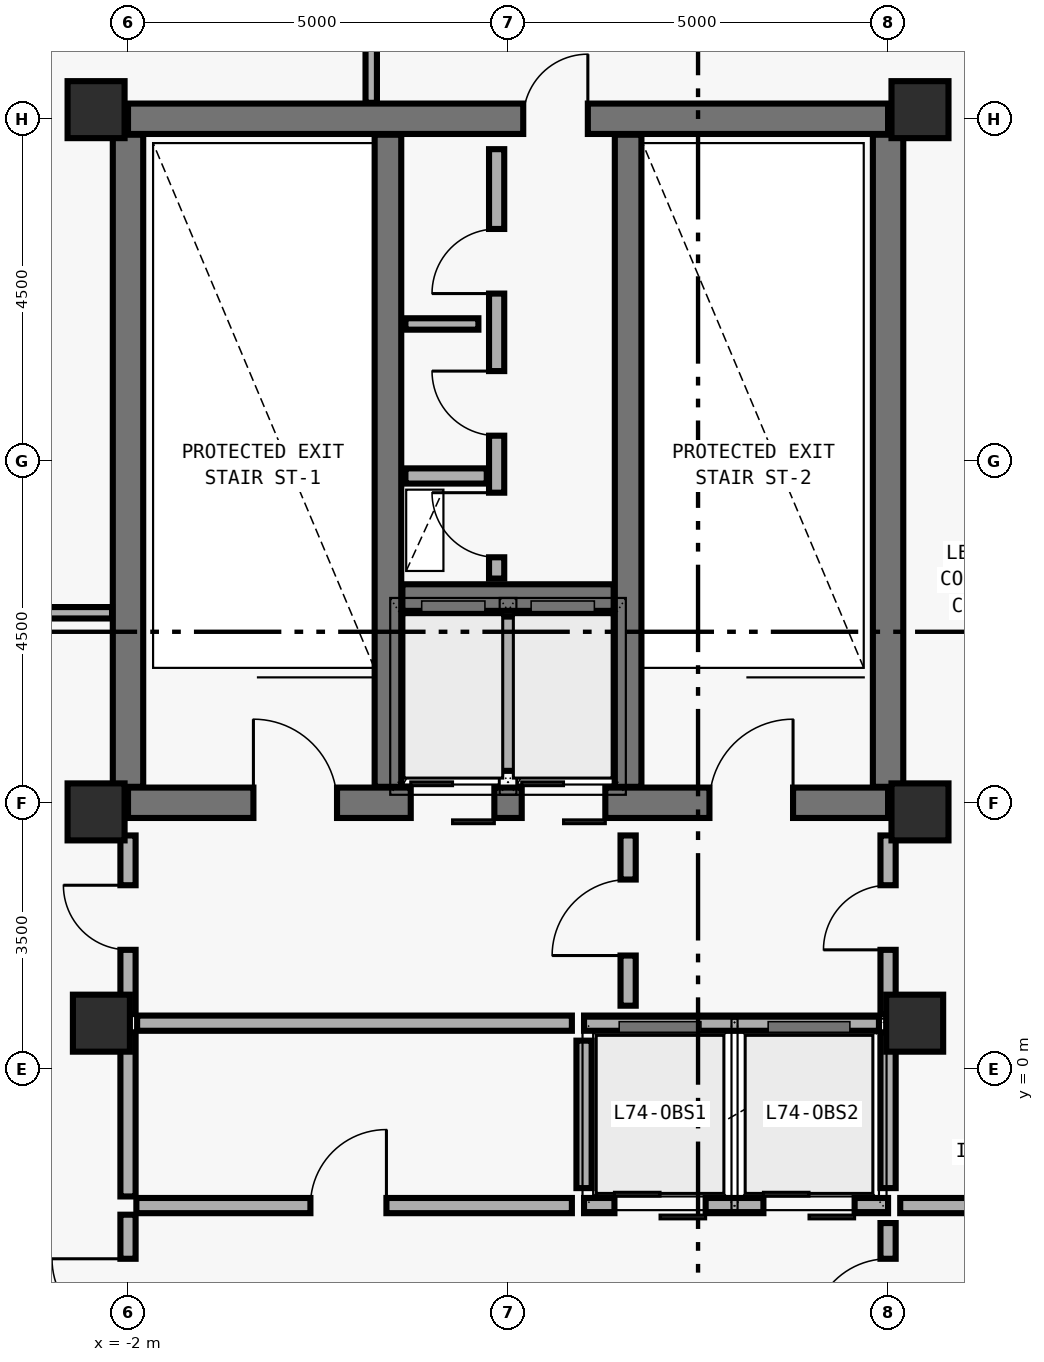
"""IFC4 building model, lengths in metres.
Left out: names, types, materials, properties, quantities, classifications, styles, units other than length and angle.
Written with IfcOpenShell. Run it as: python <this file> out.ifc"""

import sys

from ifc_helpers import new_model, si_unit, direction, frame, frame_2d, origin, origin_2d, place, context, subcontext, project, spatial, rectangle, extrude, element, fill, save


model = new_model("IFC4")
c1 = context("Model", 3, precision=1e-05, world=origin(), true_north=direction((0.0, 1.0)))
c2 = subcontext(c1, "Body", "Model", "MODEL_VIEW")
j1 = project(units=[si_unit("LENGTHUNIT", "METRE"), si_unit("PLANEANGLEUNIT", "RADIAN")], contexts=[c1])
p1 = place(None, origin())
s1 = spatial("IfcSite", under=j1, at=p1, CompositionType="ELEMENT")
p2 = place(p1, origin())
s2 = spatial("IfcBuilding", under=s1, at=p2, CompositionType="ELEMENT")
p3 = place(p2, frame((0.0, 0.0, 289.5)))
s3 = spatial("IfcBuildingStorey", under=s2, at=p3, CompositionType="ELEMENT", Elevation=289.5)
p4 = place(p3, frame((-2.0, 3.5, 0.0), z_axis=(0.0, 0.0, 1.0), x_axis=(1.0, 0.0, 0.0)))
e1 = element("IfcWall", 1, at=p4, inside=s3, PredefinedType="SHEAR", context=c2, shape_type="SweptSolid", body=[
    extrude(rectangle(XDim=10.0, YDim=0.4, at=frame_2d((5.0, 0.0))), origin(), (0.0, 0.0, 1.0), 4.492),
])
p5 = place(p4, frame((1.65, 0.0, 0.0)))
e2 = element("IfcOpeningElement", 2, at=p5, cuts=e1, PredefinedType="OPENING", context=c2, shape_type="SweptSolid", body=[
    extrude(rectangle(XDim=1.1, YDim=2.15, at=frame_2d((0.55, 1.075))), frame((0.0, 0.21, 0.0), z_axis=(0.0, -1.0, 0.0), x_axis=(1.0, 0.0, 0.0)), (0.0, 0.0, 1.0), 0.42),
])
p6 = place(p4, frame((7.65, 0.0, 0.0)))
e3 = element("IfcOpeningElement", 3, at=p6, cuts=e1, PredefinedType="OPENING", context=c2, shape_type="SweptSolid", body=[
    extrude(rectangle(XDim=1.1, YDim=2.15, at=frame_2d((0.55, 1.075))), frame((0.0, 0.21, 0.0), z_axis=(0.0, -1.0, 0.0), x_axis=(1.0, 0.0, 0.0)), (0.0, 0.0, 1.0), 0.42),
])
p7 = place(p4, frame((3.72, 0.0, 0.0)))
e4 = element("IfcOpeningElement", 4, at=p7, cuts=e1, PredefinedType="OPENING", context=c2, shape_type="SweptSolid", body=[
    extrude(rectangle(XDim=1.1, YDim=2.2, at=frame_2d((0.55, 1.1))), frame((0.0, 0.21, 0.0), z_axis=(0.0, -1.0, 0.0), x_axis=(1.0, 0.0, 0.0)), (0.0, 0.0, 1.0), 0.42),
])
p8 = place(p4, frame((5.18, 0.0, 0.0)))
e5 = element("IfcOpeningElement", 5, at=p8, cuts=e1, PredefinedType="OPENING", context=c2, shape_type="SweptSolid", body=[
    extrude(rectangle(XDim=1.1, YDim=2.2, at=frame_2d((0.55, 1.1))), frame((0.0, 0.21, 0.0), z_axis=(0.0, -1.0, 0.0), x_axis=(1.0, 0.0, 0.0)), (0.0, 0.0, 1.0), 0.42),
])
p9 = place(p3, frame((-2.0, 12.5, 0.0), z_axis=(0.0, 0.0, 1.0), x_axis=(1.0, 0.0, 0.0)))
e6 = element("IfcWall", 6, at=p9, inside=s3, PredefinedType="SHEAR", context=c2, shape_type="SweptSolid", body=[
    extrude(rectangle(XDim=10.0, YDim=0.4, at=frame_2d((5.0, 0.0))), origin(), (0.0, 0.0, 1.0), 4.492),
])
p10 = place(p9, frame((5.2, 0.0, 0.0)))
e7 = element("IfcOpeningElement", 7, at=p10, cuts=e6, PredefinedType="OPENING", context=c2, shape_type="SweptSolid", body=[
    extrude(rectangle(XDim=0.85, YDim=2.1, at=frame_2d((0.425, 1.05))), frame((0.0, 0.21, 0.0), z_axis=(0.0, -1.0, 0.0), x_axis=(1.0, 0.0, 0.0)), (0.0, 0.0, 1.0), 0.42),
])
for number, where, z_axis, x_axis in (
    (8, (-2.0, 3.71, 0.0), (0.0, 0.0, 1.0), (0.0, 1.0, 0.0)),
    (9, (8.0, 3.71, 0.0), (0.0, 0.0, 1.0), (0.0, 1.0, 0.0)),
):
    element("IfcWall", number, at=place(p3, frame(where, z_axis=z_axis, x_axis=x_axis)), inside=s3, PredefinedType="SHEAR", context=c2, shape_type="SweptSolid", body=[
        extrude(rectangle(XDim=8.58, YDim=0.4, at=frame_2d((4.29, 0.0))), origin(), (0.0, 0.0, 1.0), 4.492),
    ])
for number, where, z_axis, x_axis in (
    (10, (1.42, 3.71, 0.0), (0.0, 0.0, 1.0), (0.0, 1.0, 0.0)),
    (11, (4.58, 3.71, 0.0), (0.0, 0.0, 1.0), (0.0, 1.0, 0.0)),
):
    element("IfcWall", number, at=place(p3, frame(where, z_axis=z_axis, x_axis=x_axis)), inside=s3, PredefinedType="SHEAR", context=c2, shape_type="SweptSolid", body=[
        extrude(rectangle(XDim=8.58, YDim=0.35, at=frame_2d((4.29, 0.0))), origin(), (0.0, 0.0, 1.0), 4.492),
    ])
p11 = place(p3, frame((1.61, 6.2, 0.0), z_axis=(0.0, 0.0, 1.0), x_axis=(1.0, 0.0, 0.0)))
e12 = element("IfcWall", 12, at=p11, inside=s3, PredefinedType="SHEAR", context=c2, shape_type="SweptSolid", body=[
    extrude(rectangle(XDim=2.78, YDim=0.35, at=frame_2d((1.39, 0.0))), origin(), (0.0, 0.0, 1.0), 4.492),
])
for number, where, z_axis, x_axis in (
    (13, (-2.42, 12.62, 0.0), (0.0, 0.0, 1.0), (1.0, 0.0, 0.0)),
    (14, (8.42, 12.62, 0.0), (0.0, 0.0, 1.0), (1.0, 0.0, 0.0)),
    (15, (-2.42, 3.38, 0.0), (0.0, 0.0, 1.0), (1.0, 0.0, 0.0)),
    (16, (8.42, 3.38, 0.0), (0.0, 0.0, 1.0), (1.0, 0.0, 0.0)),
    (17, (-2.35, 0.6, 0.0), (0.0, 0.0, 1.0), (1.0, 0.0, 0.0)),
    (18, (8.35, 0.6, 0.0), (0.0, 0.0, 1.0), (1.0, 0.0, 0.0)),
):
    element("IfcColumn", number, at=place(p3, frame(where, z_axis=z_axis, x_axis=x_axis)), inside=s3, PredefinedType="COLUMN", context=c2, shape_type="SweptSolid", body=[
        extrude(rectangle(XDim=0.75, YDim=0.75, at=origin_2d()), origin(), (0.0, 0.0, 1.0), 4.475),
    ])
p12 = place(p3, frame((3.0, 3.92, 0.0), z_axis=(0.0, 0.0, 1.0), x_axis=(0.0, 1.0, 0.0)))
e19 = element("IfcWall", 19, at=p12, inside=s3, PredefinedType="SOLIDWALL", context=c2, shape_type="SweptSolid", body=[
    extrude(rectangle(XDim=2.03, YDim=0.2, at=frame_2d((1.015, 0.0))), origin(), (0.0, 0.0, 1.0), 4.26),
])
p13 = place(p3, frame((1.65, 7.8, 0.0), z_axis=(0.0, 0.0, 1.0), x_axis=(1.0, 0.0, 0.0)))
e20 = element("IfcWall", 20, at=p13, inside=s3, PredefinedType="SOLIDWALL", context=c2, shape_type="SweptSolid", body=[
    extrude(rectangle(XDim=1.07, YDim=0.2, at=frame_2d((0.535, 0.0))), origin(), (0.0, 0.0, 1.0), 4.26),
])
p14 = place(p3, frame((4.0, 0.6, 0.0), z_axis=(0.0, 0.0, 1.0), x_axis=(1.0, 0.0, 0.0)))
e21 = element("IfcWall", 21, at=p14, inside=s3, PredefinedType="SOLIDWALL", context=c2, shape_type="SweptSolid", body=[
    extrude(rectangle(XDim=3.88, YDim=0.2, at=frame_2d((1.94, 0.0))), origin(), (0.0, 0.0, 1.0), 3.972),
])
p15 = place(p3, frame((4.0, -1.8, 0.0), z_axis=(0.0, 0.0, 1.0), x_axis=(1.0, 0.0, 0.0)))
e22 = element("IfcWall", 22, at=p15, inside=s3, PredefinedType="SOLIDWALL", context=c2, shape_type="SweptSolid", body=[
    extrude(rectangle(XDim=4.0, YDim=0.2, at=frame_2d((2.0, 0.0))), origin(), (0.0, 0.0, 1.0), 4.26),
])
p16 = place(p15, frame((0.4, 0.0, 0.0)))
e23 = element("IfcOpeningElement", 23, at=p16, cuts=e22, PredefinedType="OPENING", context=c2, shape_type="SweptSolid", body=[
    extrude(rectangle(XDim=1.2, YDim=2.25, at=frame_2d((0.6, 1.125))), frame((0.0, 0.11, 0.0), z_axis=(0.0, -1.0, 0.0), x_axis=(1.0, 0.0, 0.0)), (0.0, 0.0, 1.0), 0.22),
])
p17 = place(p15, frame((2.36, 0.0, 0.0)))
e24 = element("IfcOpeningElement", 24, at=p17, cuts=e22, PredefinedType="OPENING", context=c2, shape_type="SweptSolid", body=[
    extrude(rectangle(XDim=1.2, YDim=2.25, at=frame_2d((0.6, 1.125))), frame((0.0, 0.11, 0.0), z_axis=(0.0, -1.0, 0.0), x_axis=(1.0, 0.0, 0.0)), (0.0, 0.0, 1.0), 0.22),
])
p18 = place(p3, frame((4.0, -1.57, 0.0), z_axis=(0.0, 0.0, 1.0), x_axis=(0.0, 1.0, 0.0)))
e25 = element("IfcWall", 25, at=p18, inside=s3, PredefinedType="SOLIDWALL", context=c2, shape_type="SweptSolid", body=[
    extrude(rectangle(XDim=1.94, YDim=0.2, at=frame_2d((0.97, 0.0))), origin(), (0.0, 0.0, 1.0), 4.26),
])
p19 = place(p3, frame((8.0, -1.57, 0.0), z_axis=(0.0, 0.0, 1.0), x_axis=(0.0, 1.0, 0.0)))
e26 = element("IfcWall", 26, at=p19, inside=s3, PredefinedType="SOLIDWALL", context=c2, shape_type="SweptSolid", body=[
    extrude(rectangle(XDim=2.05, YDim=0.2, at=frame_2d((1.025, 0.0))), origin(), (0.0, 0.0, 1.0), 3.972),
])
p20 = place(p3, frame((2.85, 6.45, 0.0), z_axis=(0.0, 0.0, 1.0), x_axis=(0.0, 1.0, 0.0)))
e27 = element("IfcWall", 27, at=p20, inside=s3, PredefinedType="MOVABLE", context=c2, shape_type="SweptSolid", body=[
    extrude(rectangle(XDim=5.65, YDim=0.2, at=frame_2d((2.825, 0.0))), origin(), (0.0, 0.0, 1.0), 4.26),
])
p21 = place(p20, frame((1.88, 0.0, 0.0)))
e28 = element("IfcOpeningElement", 28, at=p21, cuts=e27, PredefinedType="OPENING", context=c2, shape_type="SweptSolid", body=[
    extrude(rectangle(XDim=0.85, YDim=2.05, at=frame_2d((0.425, 1.025))), frame((0.0, 0.11, 0.0), z_axis=(0.0, -1.0, 0.0), x_axis=(1.0, 0.0, 0.0)), (0.0, 0.0, 1.0), 0.22),
])
p22 = place(p20, frame((3.75, 0.0, 0.0)))
e29 = element("IfcOpeningElement", 29, at=p22, cuts=e27, PredefinedType="OPENING", context=c2, shape_type="SweptSolid", body=[
    extrude(rectangle(XDim=0.85, YDim=2.1, at=frame_2d((0.425, 1.05))), frame((0.0, 0.11, 0.0), z_axis=(0.0, -1.0, 0.0), x_axis=(1.0, 0.0, 0.0)), (0.0, 0.0, 1.0), 0.22),
])
p23 = place(p20, frame((0.28, 0.0, 0.0)))
e30 = element("IfcOpeningElement", 30, at=p23, cuts=e27, PredefinedType="OPENING", context=c2, shape_type="SweptSolid", body=[
    extrude(rectangle(XDim=0.85, YDim=2.1, at=frame_2d((0.425, 1.05))), frame((0.0, 0.11, 0.0), z_axis=(0.0, -1.0, 0.0), x_axis=(1.0, 0.0, 0.0)), (0.0, 0.0, 1.0), 0.22),
])
p24 = place(p3, frame((4.58, 0.83, 0.0), z_axis=(0.0, 0.0, 1.0), x_axis=(0.0, 1.0, 0.0)))
e31 = element("IfcWall", 31, at=p24, inside=s3, PredefinedType="MOVABLE", context=c2, shape_type="SweptSolid", body=[
    extrude(rectangle(XDim=2.24, YDim=0.2, at=frame_2d((1.12, 0.0))), origin(), (0.0, 0.0, 1.0), 4.26),
])
p25 = place(p24, frame((0.66, 0.0, 0.0)))
e32 = element("IfcOpeningElement", 32, at=p25, cuts=e31, PredefinedType="OPENING", context=c2, shape_type="SweptSolid", body=[
    extrude(rectangle(XDim=1.0, YDim=2.1, at=frame_2d((0.5, 1.05))), frame((0.0, 0.11, 0.0), z_axis=(0.0, -1.0, 0.0), x_axis=(1.0, 0.0, 0.0)), (0.0, 0.0, 1.0), 0.22),
])
p26 = place(p3, frame((-2.0, 0.72, 0.0), z_axis=(0.0, 0.0, 1.0), x_axis=(0.0, 1.0, 0.0)))
e33 = element("IfcWall", 33, at=p26, inside=s3, PredefinedType="MOVABLE", context=c2, shape_type="SweptSolid", body=[
    extrude(rectangle(XDim=2.35, YDim=0.2, at=frame_2d((1.175, 0.0))), origin(), (0.0, 0.0, 1.0), 3.592),
])
p27 = place(p26, frame((0.845, 0.0, 0.0)))
e34 = element("IfcOpeningElement", 34, at=p27, cuts=e33, PredefinedType="OPENING", context=c2, shape_type="SweptSolid", body=[
    extrude(rectangle(XDim=0.85, YDim=2.1, at=frame_2d((0.425, 1.05))), frame((0.0, 0.11, 0.0), z_axis=(0.0, -1.0, 0.0), x_axis=(1.0, 0.0, 0.0)), (0.0, 0.0, 1.0), 0.22),
])
p28 = place(p3, frame((8.0, 0.72, 0.0), z_axis=(0.0, 0.0, 1.0), x_axis=(0.0, 1.0, 0.0)))
e35 = element("IfcWall", 35, at=p28, inside=s3, PredefinedType="MOVABLE", context=c2, shape_type="SweptSolid", body=[
    extrude(rectangle(XDim=2.35, YDim=0.2, at=frame_2d((1.175, 0.0))), origin(), (0.0, 0.0, 1.0), 3.592),
])
p29 = place(p28, frame((0.845, 0.0, 0.0)))
e36 = element("IfcOpeningElement", 36, at=p29, cuts=e35, PredefinedType="OPENING", context=c2, shape_type="SweptSolid", body=[
    extrude(rectangle(XDim=0.85, YDim=2.1, at=frame_2d((0.425, 1.05))), frame((0.0, 0.11, 0.0), z_axis=(0.0, -1.0, 0.0), x_axis=(1.0, 0.0, 0.0)), (0.0, 0.0, 1.0), 0.22),
])
p30 = place(p3, frame((-2.0, -4.08, 0.0), z_axis=(0.0, 0.0, 1.0), x_axis=(0.0, 1.0, 0.0)))
e37 = element("IfcWall", 37, at=p30, inside=s3, PredefinedType="MOVABLE", context=c2, shape_type="SweptSolid", body=[
    extrude(rectangle(XDim=2.16, YDim=0.2, at=frame_2d((1.08, 0.0))), origin(), (0.0, 0.0, 1.0), 3.972),
])
p31 = place(p30, frame((0.58, 0.0, 0.0)))
e38 = element("IfcOpeningElement", 38, at=p31, cuts=e37, PredefinedType="OPENING", context=c2, shape_type="SweptSolid", body=[
    extrude(rectangle(XDim=1.0, YDim=2.1, at=frame_2d((0.5, 1.05))), frame((0.0, 0.11, 0.0), z_axis=(0.0, -1.0, 0.0), x_axis=(1.0, 0.0, 0.0)), (0.0, 0.0, 1.0), 0.22),
])
p32 = place(p3, frame((8.0, -3.97, 0.0), z_axis=(0.0, 0.0, 1.0), x_axis=(0.0, 1.0, 0.0)))
e39 = element("IfcWall", 39, at=p32, inside=s3, PredefinedType="MOVABLE", context=c2, shape_type="SweptSolid", body=[
    extrude(rectangle(XDim=1.94, YDim=0.2, at=frame_2d((0.97, 0.0))), origin(), (0.0, 0.0, 1.0), 3.972),
])
p33 = place(p32, frame((0.47, 0.0, 0.0)))
e40 = element("IfcOpeningElement", 40, at=p33, cuts=e39, PredefinedType="OPENING", context=c2, shape_type="SweptSolid", body=[
    extrude(rectangle(XDim=1.0, YDim=2.1, at=frame_2d((0.5, 1.05))), frame((0.0, 0.11, 0.0), z_axis=(0.0, -1.0, 0.0), x_axis=(1.0, 0.0, 0.0)), (0.0, 0.0, 1.0), 0.22),
])
p34 = place(p3, frame((-1.89, -1.8, 0.0), z_axis=(0.0, 0.0, 1.0), x_axis=(1.0, 0.0, 0.0)))
e41 = element("IfcWall", 41, at=p34, inside=s3, PredefinedType="MOVABLE", context=c2, shape_type="SweptSolid", body=[
    extrude(rectangle(XDim=5.73, YDim=0.2, at=frame_2d((2.865, 0.0))), origin(), (0.0, 0.0, 1.0), 4.26),
])
p35 = place(p34, frame((2.29, 0.0, 0.0)))
e42 = element("IfcOpeningElement", 42, at=p35, cuts=e41, PredefinedType="OPENING", context=c2, shape_type="SweptSolid", body=[
    extrude(rectangle(XDim=1.0, YDim=2.1, at=frame_2d((0.5, 1.05))), frame((0.0, 0.11, 0.0), z_axis=(0.0, -1.0, 0.0), x_axis=(1.0, 0.0, 0.0)), (0.0, 0.0, 1.0), 0.22),
])
p36 = place(p3, frame((1.65, 9.8, 0.0), z_axis=(0.0, 0.0, 1.0), x_axis=(1.0, 0.0, 0.0)))
e43 = element("IfcWall", 43, at=p36, inside=s3, PredefinedType="PARTITIONING", context=c2, shape_type="SweptSolid", body=[
    extrude(rectangle(XDim=0.96, YDim=0.15, at=frame_2d((0.48, 0.0))), origin(), (0.0, 0.0, 1.0), 4.26),
])
p37 = place(p3, frame((-1.88, 0.6, 0.0), z_axis=(0.0, 0.0, 1.0), x_axis=(1.0, 0.0, 0.0)))
e44 = element("IfcWall", 44, at=p37, inside=s3, PredefinedType="MOVABLE", context=c2, shape_type="SweptSolid", body=[
    extrude(rectangle(XDim=5.72, YDim=0.2, at=frame_2d((2.86, 0.0))), origin(), (0.0, 0.0, 1.0), 3.972),
])
p38 = place(p3, frame((-2.0, -1.68, 0.0), z_axis=(0.0, 0.0, 1.0), x_axis=(0.0, 1.0, 0.0)))
e45 = element("IfcWall", 45, at=p38, inside=s3, PredefinedType="MOVABLE", context=c2, shape_type="SweptSolid", body=[
    extrude(rectangle(XDim=2.16, YDim=0.2, at=frame_2d((1.08, 0.0))), origin(), (0.0, 0.0, 1.0), 3.972),
])
p39 = place(p3, frame((8.16, -1.8, 0.0), z_axis=(0.0, 0.0, 1.0), x_axis=(1.0, 0.0, 0.0)))
e46 = element("IfcWall", 46, at=p39, inside=s3, PredefinedType="MOVABLE", context=c2, shape_type="SweptSolid", body=[
    extrude(rectangle(XDim=2.53, YDim=0.2, at=frame_2d((1.265, 0.0))), origin(), (0.0, 0.0, 1.0), 4.26),
])
p40 = place(p3, frame((1.2, 14.615, 0.0), z_axis=(0.0, 0.0, 1.0), x_axis=(0.0, -1.0, 0.0)))
e47 = element("IfcWall", 47, at=p40, inside=s3, PredefinedType="PARTITIONING", context=c2, shape_type="SweptSolid", body=[
    extrude(rectangle(XDim=1.905, YDim=0.15, at=frame_2d((0.953, 0.0))), origin(), (0.0, 0.0, 1.0), 4.26),
])
p41 = place(p3, frame((-2.21, 6.0, 0.0), z_axis=(0.0, 0.0, 1.0), x_axis=(-1.0, 0.0, 0.0)))
e48 = element("IfcWall", 48, at=p41, inside=s3, PredefinedType="PARTITIONING", context=c2, shape_type="SweptSolid", body=[
    extrude(rectangle(XDim=2.39, YDim=0.15, at=frame_2d((1.195, 0.0))), origin(), (0.0, 0.0, 1.0), 4.26),
])
p42 = place(p5, origin())
e49 = element("IfcDoor", 49, at=p42, inside=s3, OperationType="SINGLE_SWING_LEFT", PredefinedType="DOOR", context=c2, shape_type="SweptSolid", body=[
    extrude(rectangle(XDim=1.1, YDim=2.15, at=frame_2d((0.55, 1.075))), frame((0.0, 0.025, 0.0), z_axis=(0.0, -1.0, 0.0), x_axis=(1.0, 0.0, 0.0)), (0.0, 0.0, 1.0), 0.05),
])
fill(e2, e49)
p43 = place(p6, origin())
e50 = element("IfcDoor", 50, at=p43, inside=s3, OperationType="SINGLE_SWING_RIGHT", PredefinedType="DOOR", context=c2, shape_type="SweptSolid", body=[
    extrude(rectangle(XDim=1.1, YDim=2.15, at=frame_2d((0.55, 1.075))), frame((0.0, 0.025, 0.0), z_axis=(0.0, -1.0, 0.0), x_axis=(1.0, 0.0, 0.0)), (0.0, 0.0, 1.0), 0.05),
])
fill(e3, e50)
p44 = place(p7, origin())
e51 = element("IfcDoor", 51, at=p44, inside=s3, OperationType="DOUBLE_DOOR_SLIDING", PredefinedType="DOOR", context=c2, shape_type="SweptSolid", body=[
    extrude(rectangle(XDim=1.1, YDim=2.2, at=frame_2d((0.55, 1.1))), frame((0.0, 0.025, 0.0), z_axis=(0.0, -1.0, 0.0), x_axis=(1.0, 0.0, 0.0)), (0.0, 0.0, 1.0), 0.05),
])
fill(e4, e51)
p45 = place(p8, origin())
e52 = element("IfcDoor", 52, at=p45, inside=s3, OperationType="DOUBLE_DOOR_SLIDING", PredefinedType="DOOR", context=c2, shape_type="SweptSolid", body=[
    extrude(rectangle(XDim=1.1, YDim=2.2, at=frame_2d((0.55, 1.1))), frame((0.0, 0.025, 0.0), z_axis=(0.0, -1.0, 0.0), x_axis=(1.0, 0.0, 0.0)), (0.0, 0.0, 1.0), 0.05),
])
fill(e5, e52)
p46 = place(p10, origin())
e53 = element("IfcDoor", 53, at=p46, inside=s3, OperationType="SINGLE_SWING_RIGHT", PredefinedType="DOOR", context=c2, shape_type="SweptSolid", body=[
    extrude(rectangle(XDim=0.85, YDim=2.1, at=frame_2d((0.425, 1.05))), frame((0.0, 0.025, 0.0), z_axis=(0.0, -1.0, 0.0), x_axis=(1.0, 0.0, 0.0)), (0.0, 0.0, 1.0), 0.05),
])
fill(e7, e53)
p47 = place(p21, origin())
e54 = element("IfcDoor", 54, at=p47, inside=s3, OperationType="SINGLE_SWING_RIGHT", PredefinedType="DOOR", context=c2, shape_type="SweptSolid", body=[
    extrude(rectangle(XDim=0.85, YDim=2.05, at=frame_2d((0.425, 1.025))), frame((0.0, 0.025, 0.0), z_axis=(0.0, -1.0, 0.0), x_axis=(1.0, 0.0, 0.0)), (0.0, 0.0, 1.0), 0.05),
])
fill(e28, e54)
p48 = place(p22, origin())
e55 = element("IfcDoor", 55, at=p48, inside=s3, OperationType="SINGLE_SWING_LEFT", PredefinedType="DOOR", context=c2, shape_type="SweptSolid", body=[
    extrude(rectangle(XDim=0.85, YDim=2.1, at=frame_2d((0.425, 1.05))), frame((0.0, 0.025, 0.0), z_axis=(0.0, -1.0, 0.0), x_axis=(1.0, 0.0, 0.0)), (0.0, 0.0, 1.0), 0.05),
])
fill(e29, e55)
p49 = place(p23, origin())
e56 = element("IfcDoor", 56, at=p49, inside=s3, OperationType="SINGLE_SWING_RIGHT", PredefinedType="DOOR", context=c2, shape_type="SweptSolid", body=[
    extrude(rectangle(XDim=0.85, YDim=2.1, at=frame_2d((0.425, 1.05))), frame((0.0, 0.025, 0.0), z_axis=(0.0, -1.0, 0.0), x_axis=(1.0, 0.0, 0.0)), (0.0, 0.0, 1.0), 0.05),
])
fill(e30, e56)
p50 = place(p25, origin())
e57 = element("IfcDoor", 57, at=p50, inside=s3, OperationType="SINGLE_SWING_LEFT", PredefinedType="DOOR", context=c2, shape_type="SweptSolid", body=[
    extrude(rectangle(XDim=1.0, YDim=2.1, at=frame_2d((0.5, 1.05))), frame((0.0, 0.025, 0.0), z_axis=(0.0, -1.0, 0.0), x_axis=(1.0, 0.0, 0.0)), (0.0, 0.0, 1.0), 0.05),
])
fill(e32, e57)
p51 = place(p27, origin())
e58 = element("IfcDoor", 58, at=p51, inside=s3, OperationType="SINGLE_SWING_RIGHT", PredefinedType="DOOR", context=c2, shape_type="SweptSolid", body=[
    extrude(rectangle(XDim=0.85, YDim=2.1, at=frame_2d((0.425, 1.05))), frame((0.0, 0.025, 0.0), z_axis=(0.0, -1.0, 0.0), x_axis=(1.0, 0.0, 0.0)), (0.0, 0.0, 1.0), 0.05),
])
fill(e34, e58)
p52 = place(p29, origin())
e59 = element("IfcDoor", 59, at=p52, inside=s3, OperationType="SINGLE_SWING_LEFT", PredefinedType="DOOR", context=c2, shape_type="SweptSolid", body=[
    extrude(rectangle(XDim=0.85, YDim=2.1, at=frame_2d((0.425, 1.05))), frame((0.0, 0.025, 0.0), z_axis=(0.0, -1.0, 0.0), x_axis=(1.0, 0.0, 0.0)), (0.0, 0.0, 1.0), 0.05),
])
fill(e36, e59)
p53 = place(p31, origin())
e60 = element("IfcDoor", 60, at=p53, inside=s3, OperationType="SINGLE_SWING_RIGHT", PredefinedType="DOOR", context=c2, shape_type="SweptSolid", body=[
    extrude(rectangle(XDim=1.0, YDim=2.1, at=frame_2d((0.5, 1.05))), frame((0.0, 0.025, 0.0), z_axis=(0.0, -1.0, 0.0), x_axis=(1.0, 0.0, 0.0)), (0.0, 0.0, 1.0), 0.05),
])
fill(e38, e60)
p54 = place(p33, origin())
e61 = element("IfcDoor", 61, at=p54, inside=s3, OperationType="SINGLE_SWING_LEFT", PredefinedType="DOOR", context=c2, shape_type="SweptSolid", body=[
    extrude(rectangle(XDim=1.0, YDim=2.1, at=frame_2d((0.5, 1.05))), frame((0.0, 0.025, 0.0), z_axis=(0.0, -1.0, 0.0), x_axis=(1.0, 0.0, 0.0)), (0.0, 0.0, 1.0), 0.05),
])
fill(e40, e61)
p55 = place(p35, origin())
e62 = element("IfcDoor", 62, at=p55, inside=s3, OperationType="SINGLE_SWING_RIGHT", PredefinedType="DOOR", context=c2, shape_type="SweptSolid", body=[
    extrude(rectangle(XDim=1.0, YDim=2.1, at=frame_2d((0.5, 1.05))), frame((0.0, 0.025, 0.0), z_axis=(0.0, -1.0, 0.0), x_axis=(1.0, 0.0, 0.0)), (0.0, 0.0, 1.0), 0.05),
])
fill(e42, e62)
p56 = place(p16, origin())
e63 = element("IfcDoor", 63, at=p56, inside=s3, OperationType="DOUBLE_DOOR_SLIDING", PredefinedType="DOOR", context=c2, shape_type="SweptSolid", body=[
    extrude(rectangle(XDim=1.2, YDim=2.25, at=frame_2d((0.6, 1.125))), frame((0.0, 0.025, 0.0), z_axis=(0.0, -1.0, 0.0), x_axis=(1.0, 0.0, 0.0)), (0.0, 0.0, 1.0), 0.05),
])
fill(e23, e63)
p57 = place(p17, origin())
e64 = element("IfcDoor", 64, at=p57, inside=s3, OperationType="DOUBLE_DOOR_SLIDING", PredefinedType="DOOR", context=c2, shape_type="SweptSolid", body=[
    extrude(rectangle(XDim=1.2, YDim=2.25, at=frame_2d((0.6, 1.125))), frame((0.0, 0.025, 0.0), z_axis=(0.0, -1.0, 0.0), x_axis=(1.0, 0.0, 0.0)), (0.0, 0.0, 1.0), 0.05),
])
fill(e24, e64)
save(model, sys.argv[1])
